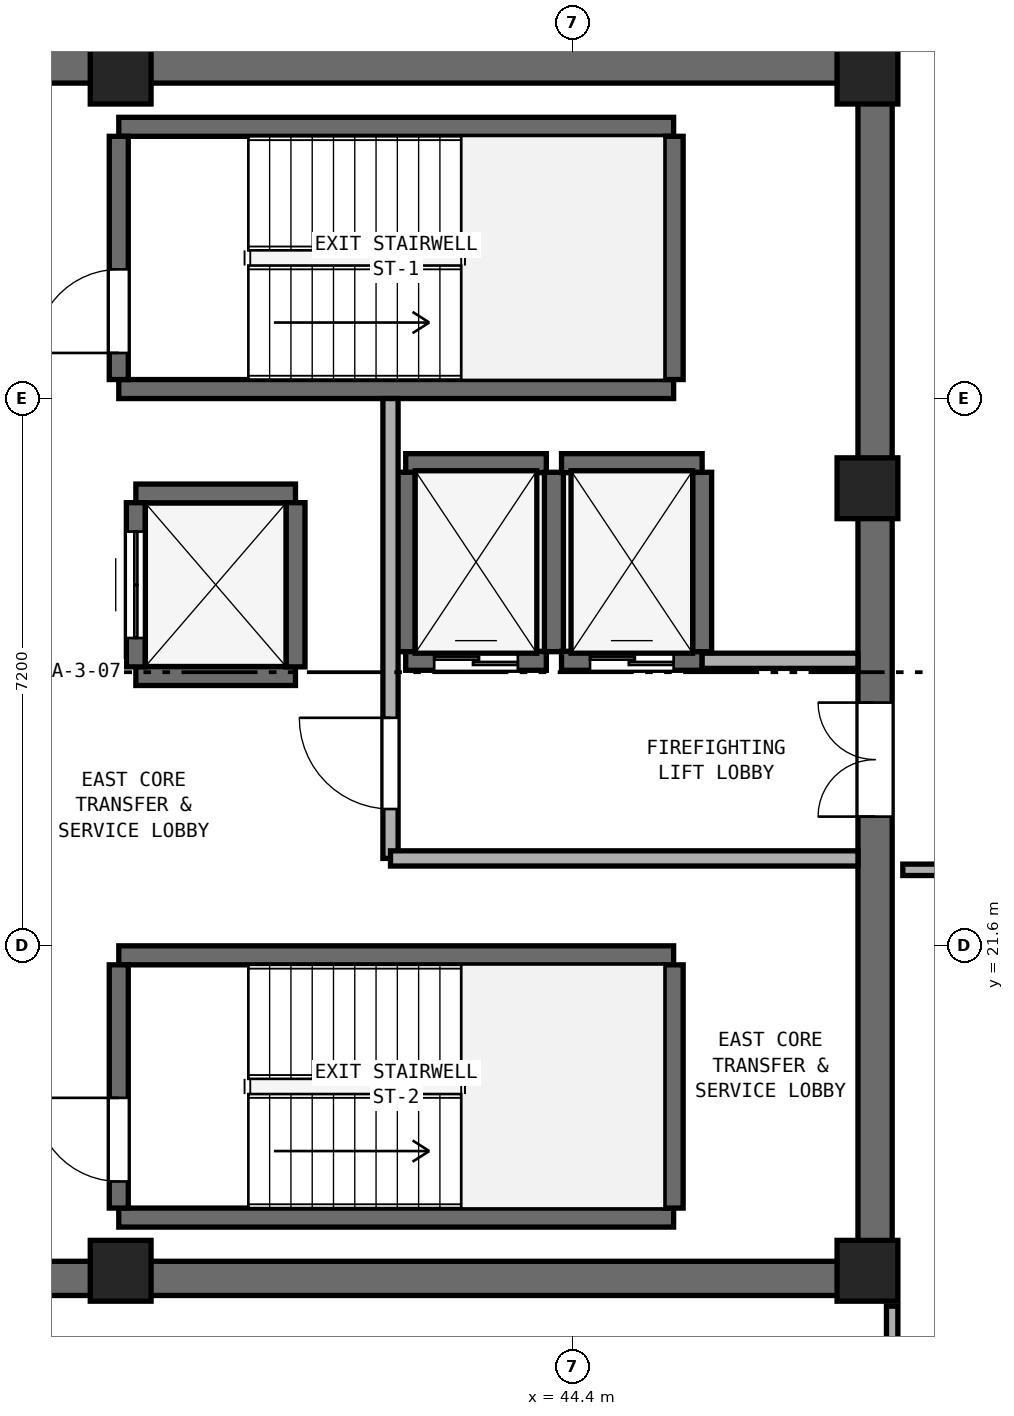
"""IFC4 building model, lengths in metres.
Left out: names, types, materials, properties, quantities, classifications, styles, units other than length and angle.
Written with IfcOpenShell. Run it as: python <this file> out.ifc"""

import sys

from ifc_helpers import new_model, si_unit, direction, frame, frame_2d, origin, origin_2d, place, context, subcontext, project, spatial, rectangle, extrude, element, fill, save


model = new_model("IFC4")
c1 = context("Model", 3, precision=1e-05, world=origin(), true_north=direction((0.0, 1.0)))
c2 = subcontext(c1, "Body", "Model", "MODEL_VIEW")
j1 = project(units=[si_unit("LENGTHUNIT", "METRE"), si_unit("PLANEANGLEUNIT", "RADIAN")], contexts=[c1])
p1 = place(None, origin())
s1 = spatial("IfcSite", under=j1, at=p1, CompositionType="ELEMENT")
p2 = place(p1, origin())
s2 = spatial("IfcBuilding", under=s1, at=p2, CompositionType="ELEMENT")
p3 = place(p2, frame((0.0, 0.0, 232.6)))
s3 = spatial("IfcBuildingStorey", under=s2, at=p3, CompositionType="ELEMENT", Elevation=232.6)
for number, where, z_axis, x_axis in (
    (1, (25.4, 17.225, 0.0), (0.0, 0.0, 1.0), (1.0, 0.0, 0.0)),
    (2, (25.4, 33.175, 0.0), (0.0, 0.0, 1.0), (1.0, 0.0, 0.0)),
):
    element("IfcWall", number, at=place(p3, frame(where, z_axis=z_axis, x_axis=x_axis)), inside=s3, PredefinedType="SHEAR", context=c2, shape_type="SweptSolid", body=[
        extrude(rectangle(XDim=23.2, YDim=0.45, at=frame_2d((11.6, 0.0))), origin(), (0.0, 0.0, 1.0), 3.51),
    ])
p4 = place(p3, frame((48.375, 17.45, 0.0), z_axis=(0.0, 0.0, 1.0), x_axis=(0.0, 1.0, 0.0)))
e3 = element("IfcWall", 3, at=p4, inside=s3, PredefinedType="SHEAR", context=c2, shape_type="SweptSolid", body=[
    extrude(rectangle(XDim=15.5, YDim=0.45, at=frame_2d((7.75, 0.0))), origin(), (0.0, 0.0, 1.0), 3.51),
])
p5 = place(p4, frame((5.85, 0.0, 0.0)))
e4 = element("IfcOpeningElement", 4, at=p5, cuts=e3, PredefinedType="OPENING", context=c2, shape_type="SweptSolid", body=[
    extrude(rectangle(XDim=1.5, YDim=2.15, at=frame_2d((0.75, 1.075))), frame((0.0, 0.235, 0.0), z_axis=(0.0, -1.0, 0.0), x_axis=(1.0, 0.0, 0.0)), (0.0, 0.0, 1.0), 0.47),
])
for number, where, z_axis, x_axis in (
    (5, (38.45, 17.325, 0.0), (0.0, 0.0, 1.0), (1.0, 0.0, 0.0)),
    (6, (48.275, 17.325, 0.0), (0.0, 0.0, 1.0), (1.0, 0.0, 0.0)),
    (7, (48.275, 27.62, 0.0), (0.0, 0.0, 1.0), (1.0, 0.0, 0.0)),
    (8, (48.275, 33.075, 0.0), (0.0, 0.0, 1.0), (1.0, 0.0, 0.0)),
    (9, (38.45, 33.075, 0.0), (0.0, 0.0, 1.0), (1.0, 0.0, 0.0)),
):
    element("IfcColumn", number, at=place(p3, frame(where, z_axis=z_axis, x_axis=x_axis)), inside=s3, PredefinedType="PILASTER", context=c2, shape_type="SweptSolid", body=[
        extrude(rectangle(XDim=0.8, YDim=0.8, at=origin_2d()), origin(), (0.0, 0.0, 1.0), 3.8),
    ])
for number, where, z_axis, x_axis in (
    (10, (38.425, 28.925, 0.0), (0.0, 0.0, 1.0), (1.0, 0.0, 0.0)),
    (11, (38.425, 32.375, 0.0), (0.0, 0.0, 1.0), (1.0, 0.0, 0.0)),
):
    element("IfcWall", number, at=place(p3, frame(where, z_axis=z_axis, x_axis=x_axis)), inside=s3, PredefinedType="SHEAR", context=c2, shape_type="SweptSolid", body=[
        extrude(rectangle(XDim=7.3, YDim=0.25, at=frame_2d((3.65, 0.0))), origin(), (0.0, 0.0, 1.0), 3.51),
    ])
p6 = place(p3, frame((38.425, 29.05, 0.0), z_axis=(0.0, 0.0, 1.0), x_axis=(0.0, 1.0, 0.0)))
e12 = element("IfcWall", 12, at=p6, inside=s3, PredefinedType="SHEAR", context=c2, shape_type="SweptSolid", body=[
    extrude(rectangle(XDim=3.2, YDim=0.25, at=frame_2d((1.6, 0.0))), origin(), (0.0, 0.0, 1.0), 3.51),
])
p7 = place(p6, frame((0.35, 0.0, 0.0)))
e13 = element("IfcOpeningElement", 13, at=p7, cuts=e12, PredefinedType="OPENING", context=c2, shape_type="SweptSolid", body=[
    extrude(rectangle(XDim=1.1, YDim=2.15, at=frame_2d((0.55, 1.075))), frame((0.0, 0.135, 0.0), z_axis=(0.0, -1.0, 0.0), x_axis=(1.0, 0.0, 0.0)), (0.0, 0.0, 1.0), 0.27),
])
p8 = place(p3, frame((45.725, 29.05, 0.0), z_axis=(0.0, 0.0, 1.0), x_axis=(0.0, 1.0, 0.0)))
e14 = element("IfcWall", 14, at=p8, inside=s3, PredefinedType="SHEAR", context=c2, shape_type="SweptSolid", body=[
    extrude(rectangle(XDim=3.2, YDim=0.25, at=frame_2d((1.6, 0.0))), origin(), (0.0, 0.0, 1.0), 3.51),
])
for number, where, z_axis, x_axis in (
    (15, (38.425, 18.025, 0.0), (0.0, 0.0, 1.0), (1.0, 0.0, 0.0)),
    (16, (38.425, 21.475, 0.0), (0.0, 0.0, 1.0), (1.0, 0.0, 0.0)),
):
    element("IfcWall", number, at=place(p3, frame(where, z_axis=z_axis, x_axis=x_axis)), inside=s3, PredefinedType="SHEAR", context=c2, shape_type="SweptSolid", body=[
        extrude(rectangle(XDim=7.3, YDim=0.25, at=frame_2d((3.65, 0.0))), origin(), (0.0, 0.0, 1.0), 3.51),
    ])
p9 = place(p3, frame((38.425, 18.15, 0.0), z_axis=(0.0, 0.0, 1.0), x_axis=(0.0, 1.0, 0.0)))
e17 = element("IfcWall", 17, at=p9, inside=s3, PredefinedType="SHEAR", context=c2, shape_type="SweptSolid", body=[
    extrude(rectangle(XDim=3.2, YDim=0.25, at=frame_2d((1.6, 0.0))), origin(), (0.0, 0.0, 1.0), 3.51),
])
p10 = place(p9, frame((0.35, 0.0, 0.0)))
e18 = element("IfcOpeningElement", 18, at=p10, cuts=e17, PredefinedType="OPENING", context=c2, shape_type="SweptSolid", body=[
    extrude(rectangle(XDim=1.1, YDim=2.15, at=frame_2d((0.55, 1.075))), frame((0.0, 0.135, 0.0), z_axis=(0.0, -1.0, 0.0), x_axis=(1.0, 0.0, 0.0)), (0.0, 0.0, 1.0), 0.27),
])
p11 = place(p3, frame((45.725, 18.15, 0.0), z_axis=(0.0, 0.0, 1.0), x_axis=(0.0, 1.0, 0.0)))
e19 = element("IfcWall", 19, at=p11, inside=s3, PredefinedType="SHEAR", context=c2, shape_type="SweptSolid", body=[
    extrude(rectangle(XDim=3.2, YDim=0.25, at=frame_2d((1.6, 0.0))), origin(), (0.0, 0.0, 1.0), 3.51),
])
p12 = place(p3, frame((42.2, 25.35, 0.0), z_axis=(0.0, 0.0, 1.0), x_axis=(1.0, 0.0, 0.0)))
e20 = element("IfcWall", 20, at=p12, inside=s3, PredefinedType="SHEAR", context=c2, shape_type="SweptSolid", body=[
    extrude(rectangle(XDim=1.85, YDim=0.25, at=frame_2d((0.925, 0.0))), origin(), (0.0, 0.0, 1.0), 3.51),
])
p13 = place(p12, frame((0.375, 0.0, 0.0)))
e21 = element("IfcOpeningElement", 21, at=p13, cuts=e20, PredefinedType="OPENING", context=c2, shape_type="SweptSolid", body=[
    extrude(rectangle(XDim=1.1, YDim=2.15, at=frame_2d((0.55, 1.075))), frame((0.0, 0.135, 0.0), z_axis=(0.0, -1.0, 0.0), x_axis=(1.0, 0.0, 0.0)), (0.0, 0.0, 1.0), 0.27),
])
p14 = place(p3, frame((42.2, 27.95, 0.0), z_axis=(0.0, 0.0, 1.0), x_axis=(1.0, 0.0, 0.0)))
e22 = element("IfcWall", 22, at=p14, inside=s3, PredefinedType="SHEAR", context=c2, shape_type="SweptSolid", body=[
    extrude(rectangle(XDim=1.85, YDim=0.25, at=frame_2d((0.925, 0.0))), origin(), (0.0, 0.0, 1.0), 3.51),
])
for number, where, z_axis, x_axis in (
    (23, (42.2, 25.47, 0.0), (0.0, 0.0, 1.0), (0.0, 1.0, 0.0)),
    (24, (44.15, 25.47, 0.0), (0.0, 0.0, 1.0), (0.0, 1.0, 0.0)),
):
    element("IfcWall", number, at=place(p3, frame(where, z_axis=z_axis, x_axis=x_axis)), inside=s3, PredefinedType="SHEAR", context=c2, shape_type="SweptSolid", body=[
        extrude(rectangle(XDim=2.36, YDim=0.25, at=frame_2d((1.18, 0.0))), origin(), (0.0, 0.0, 1.0), 3.51),
    ])
p15 = place(p3, frame((44.25, 25.35, 0.0), z_axis=(0.0, 0.0, 1.0), x_axis=(1.0, 0.0, 0.0)))
e25 = element("IfcWall", 25, at=p15, inside=s3, PredefinedType="SHEAR", context=c2, shape_type="SweptSolid", body=[
    extrude(rectangle(XDim=1.85, YDim=0.25, at=frame_2d((0.925, 0.0))), origin(), (0.0, 0.0, 1.0), 3.51),
])
p16 = place(p15, frame((0.375, 0.0, 0.0)))
e26 = element("IfcOpeningElement", 26, at=p16, cuts=e25, PredefinedType="OPENING", context=c2, shape_type="SweptSolid", body=[
    extrude(rectangle(XDim=1.1, YDim=2.15, at=frame_2d((0.55, 1.075))), frame((0.0, 0.135, 0.0), z_axis=(0.0, -1.0, 0.0), x_axis=(1.0, 0.0, 0.0)), (0.0, 0.0, 1.0), 0.27),
])
p17 = place(p3, frame((44.25, 27.95, 0.0), z_axis=(0.0, 0.0, 1.0), x_axis=(1.0, 0.0, 0.0)))
e27 = element("IfcWall", 27, at=p17, inside=s3, PredefinedType="SHEAR", context=c2, shape_type="SweptSolid", body=[
    extrude(rectangle(XDim=1.85, YDim=0.25, at=frame_2d((0.925, 0.0))), origin(), (0.0, 0.0, 1.0), 3.51),
])
p18 = place(p3, frame((46.1, 25.47, 0.0), z_axis=(0.0, 0.0, 1.0), x_axis=(0.0, 1.0, 0.0)))
e28 = element("IfcWall", 28, at=p18, inside=s3, PredefinedType="SHEAR", context=c2, shape_type="SweptSolid", body=[
    extrude(rectangle(XDim=2.36, YDim=0.25, at=frame_2d((1.18, 0.0))), origin(), (0.0, 0.0, 1.0), 3.51),
])
for number, where, z_axis, x_axis in (
    (29, (38.65, 25.15, 0.0), (0.0, 0.0, 1.0), (1.0, 0.0, 0.0)),
    (30, (38.65, 27.55, 0.0), (0.0, 0.0, 1.0), (1.0, 0.0, 0.0)),
):
    element("IfcWall", number, at=place(p3, frame(where, z_axis=z_axis, x_axis=x_axis)), inside=s3, PredefinedType="SHEAR", context=c2, shape_type="SweptSolid", body=[
        extrude(rectangle(XDim=2.1, YDim=0.25, at=frame_2d((1.05, 0.0))), origin(), (0.0, 0.0, 1.0), 3.51),
    ])
p19 = place(p3, frame((38.65, 25.27, 0.0), z_axis=(0.0, 0.0, 1.0), x_axis=(0.0, 1.0, 0.0)))
e31 = element("IfcWall", 31, at=p19, inside=s3, PredefinedType="SHEAR", context=c2, shape_type="SweptSolid", body=[
    extrude(rectangle(XDim=2.16, YDim=0.25, at=frame_2d((1.08, 0.0))), origin(), (0.0, 0.0, 1.0), 3.51),
])
p20 = place(p19, frame((0.38, 0.0, 0.0)))
e32 = element("IfcOpeningElement", 32, at=p20, cuts=e31, PredefinedType="OPENING", context=c2, shape_type="SweptSolid", body=[
    extrude(rectangle(XDim=1.4, YDim=2.2, at=frame_2d((0.7, 1.1))), frame((0.0, 0.135, 0.0), z_axis=(0.0, -1.0, 0.0), x_axis=(1.0, 0.0, 0.0)), (0.0, 0.0, 1.0), 0.27),
])
p21 = place(p3, frame((40.75, 25.27, 0.0), z_axis=(0.0, 0.0, 1.0), x_axis=(0.0, 1.0, 0.0)))
e33 = element("IfcWall", 33, at=p21, inside=s3, PredefinedType="SHEAR", context=c2, shape_type="SweptSolid", body=[
    extrude(rectangle(XDim=2.16, YDim=0.25, at=frame_2d((1.08, 0.0))), origin(), (0.0, 0.0, 1.0), 3.51),
])
p22 = place(p3, frame((42.0, 22.75, 0.0), z_axis=(0.0, 0.0, 1.0), x_axis=(0.0, 1.0, 0.0)))
e34 = element("IfcWall", 34, at=p22, inside=s3, PredefinedType="SOLIDWALL", context=c2, shape_type="SweptSolid", body=[
    extrude(rectangle(XDim=6.05, YDim=0.2, at=frame_2d((3.025, 0.0))), origin(), (0.0, 0.0, 1.0), 3.51),
])
p23 = place(p22, frame((0.65, 0.0, 0.0)))
e35 = element("IfcOpeningElement", 35, at=p23, cuts=e34, PredefinedType="OPENING", context=c2, shape_type="SweptSolid", body=[
    extrude(rectangle(XDim=1.2, YDim=2.15, at=frame_2d((0.6, 1.075))), frame((0.0, 0.11, 0.0), z_axis=(0.0, -1.0, 0.0), x_axis=(1.0, 0.0, 0.0)), (0.0, 0.0, 1.0), 0.22),
])
p24 = place(p3, frame((42.0, 22.75, 0.0), z_axis=(0.0, 0.0, 1.0), x_axis=(1.0, 0.0, 0.0)))
e36 = element("IfcWall", 36, at=p24, inside=s3, PredefinedType="SOLIDWALL", context=c2, shape_type="SweptSolid", body=[
    extrude(rectangle(XDim=6.15, YDim=0.2, at=frame_2d((3.075, 0.0))), origin(), (0.0, 0.0, 1.0), 3.51),
])
p25 = place(p3, frame((46.1, 25.35, 0.0), z_axis=(0.0, 0.0, 1.0), x_axis=(1.0, 0.0, 0.0)))
e37 = element("IfcWall", 37, at=p25, inside=s3, PredefinedType="SOLIDWALL", context=c2, shape_type="SweptSolid", body=[
    extrude(rectangle(XDim=2.05, YDim=0.2, at=frame_2d((1.025, 0.0))), origin(), (0.0, 0.0, 1.0), 3.51),
])
p26 = place(p3, frame((48.6, 13.7, 0.0), z_axis=(0.0, 0.0, 1.0), x_axis=(0.0, 1.0, 0.0)))
e38 = element("IfcWall", 38, at=p26, inside=s3, PredefinedType="PARTITIONING", context=c2, shape_type="SweptSolid", body=[
    extrude(rectangle(XDim=3.16, YDim=0.15, at=frame_2d((1.58, 0.0))), origin(), (0.0, 0.0, 1.0), 2.893),
])
p27 = place(p3, frame((48.74, 22.6, 0.0), z_axis=(0.0, 0.0, 1.0), x_axis=(1.0, 0.0, 0.0)))
e39 = element("IfcWall", 39, at=p27, inside=s3, PredefinedType="PARTITIONING", context=c2, shape_type="SweptSolid", body=[
    extrude(rectangle(XDim=3.16, YDim=0.15, at=frame_2d((1.58, 0.0))), origin(), (0.0, 0.0, 1.0), 3.51),
])
p28 = place(p7, origin())
e40 = element("IfcDoor", 40, at=p28, inside=s3, OperationType="SINGLE_SWING_LEFT", PredefinedType="DOOR", context=c2, shape_type="SweptSolid", body=[
    extrude(rectangle(XDim=1.1, YDim=2.15, at=frame_2d((0.55, 1.075))), frame((0.0, 0.025, 0.0), z_axis=(0.0, -1.0, 0.0), x_axis=(1.0, 0.0, 0.0)), (0.0, 0.0, 1.0), 0.05),
])
fill(e13, e40)
p29 = place(p10, origin())
e41 = element("IfcDoor", 41, at=p29, inside=s3, OperationType="SINGLE_SWING_RIGHT", PredefinedType="DOOR", context=c2, shape_type="SweptSolid", body=[
    extrude(rectangle(XDim=1.1, YDim=2.15, at=frame_2d((0.55, 1.075))), frame((0.0, 0.025, 0.0), z_axis=(0.0, -1.0, 0.0), x_axis=(1.0, 0.0, 0.0)), (0.0, 0.0, 1.0), 0.05),
])
fill(e18, e41)
p30 = place(p13, origin())
e42 = element("IfcDoor", 42, at=p30, inside=s3, OperationType="DOUBLE_DOOR_SLIDING", PredefinedType="DOOR", context=c2, shape_type="SweptSolid", body=[
    extrude(rectangle(XDim=1.1, YDim=2.15, at=frame_2d((0.55, 1.075))), frame((0.0, 0.025, 0.0), z_axis=(0.0, -1.0, 0.0), x_axis=(1.0, 0.0, 0.0)), (0.0, 0.0, 1.0), 0.05),
])
fill(e21, e42)
p31 = place(p16, origin())
e43 = element("IfcDoor", 43, at=p31, inside=s3, OperationType="DOUBLE_DOOR_SLIDING", PredefinedType="DOOR", context=c2, shape_type="SweptSolid", body=[
    extrude(rectangle(XDim=1.1, YDim=2.15, at=frame_2d((0.55, 1.075))), frame((0.0, 0.025, 0.0), z_axis=(0.0, -1.0, 0.0), x_axis=(1.0, 0.0, 0.0)), (0.0, 0.0, 1.0), 0.05),
])
fill(e26, e43)
p32 = place(p20, origin())
e44 = element("IfcDoor", 44, at=p32, inside=s3, OperationType="DOUBLE_DOOR_SLIDING", PredefinedType="DOOR", context=c2, shape_type="SweptSolid", body=[
    extrude(rectangle(XDim=1.4, YDim=2.2, at=frame_2d((0.7, 1.1))), frame((0.0, 0.025, 0.0), z_axis=(0.0, -1.0, 0.0), x_axis=(1.0, 0.0, 0.0)), (0.0, 0.0, 1.0), 0.05),
])
fill(e32, e44)
p33 = place(p23, origin())
e45 = element("IfcDoor", 45, at=p33, inside=s3, OperationType="SINGLE_SWING_RIGHT", PredefinedType="DOOR", context=c2, shape_type="SweptSolid", body=[
    extrude(rectangle(XDim=1.2, YDim=2.15, at=frame_2d((0.6, 1.075))), frame((0.0, 0.025, 0.0), z_axis=(0.0, -1.0, 0.0), x_axis=(1.0, 0.0, 0.0)), (0.0, 0.0, 1.0), 0.05),
])
fill(e35, e45)
p34 = place(p5, origin())
e46 = element("IfcDoor", 46, at=p34, inside=s3, OperationType="DOUBLE_DOOR_SINGLE_SWING", PredefinedType="DOOR", context=c2, shape_type="SweptSolid", body=[
    extrude(rectangle(XDim=1.5, YDim=2.15, at=frame_2d((0.75, 1.075))), frame((0.0, 0.025, 0.0), z_axis=(0.0, -1.0, 0.0), x_axis=(1.0, 0.0, 0.0)), (0.0, 0.0, 1.0), 0.05),
])
fill(e4, e46)
save(model, sys.argv[1])
